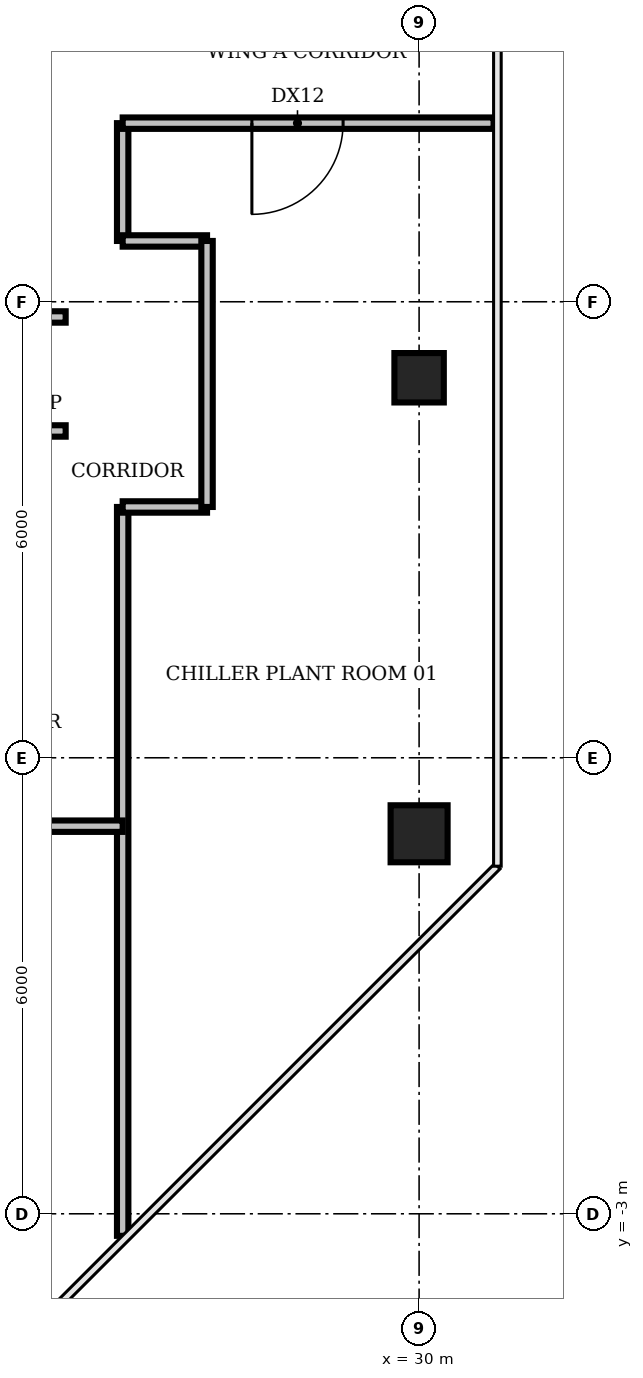
"""IFC4 building model, lengths in metres.
Left out: names, types, materials, properties, quantities, classifications, styles, units other than length and angle.
Written with IfcOpenShell. Run it as: python <this file> out.ifc"""

import sys

from ifc_helpers import new_model, si_unit, direction, frame, frame_2d, origin, origin_2d, place, context, subcontext, project, spatial, rectangle, circle, extrude, element, fill, save


model = new_model("IFC4")
c1 = context("Model", 3, precision=1e-05, world=origin(), true_north=direction((0.0, 1.0)))
c2 = subcontext(c1, "Body", "Model", "MODEL_VIEW")
j1 = project(units=[si_unit("LENGTHUNIT", "METRE"), si_unit("PLANEANGLEUNIT", "RADIAN")], contexts=[c1])
p1 = place(None, origin())
s1 = spatial("IfcSite", under=j1, at=p1, CompositionType="ELEMENT")
p2 = place(p1, origin())
s2 = spatial("IfcBuilding", under=s1, at=p2, CompositionType="ELEMENT")
p3 = place(p2, frame((0.0, 0.0, 339.8)))
s3 = spatial("IfcBuildingStorey", under=s2, at=p3, CompositionType="ELEMENT", Elevation=339.8)
p4 = place(p3, frame((30.0, 2.0, 0.0), z_axis=(0.0, 0.0, 1.0), x_axis=(1.0, 0.0, 0.0)))
e1 = element("IfcColumn", 1, at=p4, inside=s3, PredefinedType="COLUMN", context=c2, shape_type="SweptSolid", body=[
    extrude(circle(Radius=0.375, at=origin_2d()), origin(), (0.0, 0.0, 1.0), 3.9),
])
p5 = place(p3, frame((30.0, 8.0, 0.0), z_axis=(0.0, 0.0, 1.0), x_axis=(1.0, 0.0, 0.0)))
e2 = element("IfcColumn", 2, at=p5, inside=s3, PredefinedType="COLUMN", context=c2, shape_type="SweptSolid", body=[
    extrude(rectangle(XDim=0.65, YDim=0.65, at=origin_2d()), origin(), (0.0, 0.0, 1.0), 3.9),
])
for number, where, z_axis, x_axis in (
    (3, (24.3, 7.3, 0.0), (0.0, 0.0, 1.0), (1.0, 0.0, 0.0)),
    (4, (24.3, 8.8, 0.0), (0.0, 0.0, 1.0), (1.0, 0.0, 0.0)),
):
    element("IfcWall", number, at=place(p3, frame(where, z_axis=z_axis, x_axis=x_axis)), inside=s3, PredefinedType="PARTITIONING", context=c2, shape_type="SweptSolid", body=[
        extrude(rectangle(XDim=1.05, YDim=0.15, at=frame_2d((0.525, 0.0))), origin(), (0.0, 0.0, 1.0), 2.95),
    ])
p6 = place(p3, frame((26.1, -3.29, 0.0), z_axis=(0.0, 0.0, 1.0), x_axis=(0.0, 1.0, 0.0)))
e5 = element("IfcWall", 5, at=p6, inside=s3, PredefinedType="PARTITIONING", context=c2, shape_type="SweptSolid", body=[
    extrude(rectangle(XDim=9.59, YDim=0.15, at=frame_2d((4.795, 0.0))), origin(), (0.0, 0.0, 1.0), 2.95),
])
p7 = place(p3, frame((26.1, 2.1, 0.0), z_axis=(0.0, 0.0, 1.0), x_axis=(-1.0, 0.0, 0.0)))
e6 = element("IfcWall", 6, at=p7, inside=s3, PredefinedType="PARTITIONING", context=c2, shape_type="SweptSolid", body=[
    extrude(rectangle(XDim=22.2, YDim=0.15, at=frame_2d((11.1, 0.0))), origin(), (0.0, 0.0, 1.0), 2.95),
])
p8 = place(p7, frame((10.6, 0.0, 0.0)))
e7 = element("IfcOpeningElement", 7, at=p8, cuts=e6, PredefinedType="OPENING", context=c2, shape_type="SweptSolid", body=[
    extrude(rectangle(XDim=1.2, YDim=2.1, at=frame_2d((0.6, 1.05))), frame((0.0, 0.085, 0.0), z_axis=(0.0, -1.0, 0.0), x_axis=(1.0, 0.0, 0.0)), (0.0, 0.0, 1.0), 0.17),
])
p9 = place(p3, frame((26.1, 6.3, 0.0), z_axis=(0.0, 0.0, 1.0), x_axis=(1.0, 0.0, 0.0)))
e8 = element("IfcWall", 8, at=p9, inside=s3, PredefinedType="PARTITIONING", context=c2, shape_type="SweptSolid", body=[
    extrude(rectangle(XDim=1.11, YDim=0.15, at=frame_2d((0.555, 0.0))), origin(), (0.0, 0.0, 1.0), 2.95),
])
p10 = place(p3, frame((26.1, 9.8, 0.0), z_axis=(0.0, 0.0, 1.0), x_axis=(0.0, 1.0, 0.0)))
e9 = element("IfcWall", 9, at=p10, inside=s3, PredefinedType="PARTITIONING", context=c2, shape_type="SweptSolid", body=[
    extrude(rectangle(XDim=1.55, YDim=0.15, at=frame_2d((0.775, 0.0))), origin(), (0.0, 0.0, 1.0), 2.95),
])
p11 = place(p3, frame((26.1, 9.8, 0.0), z_axis=(0.0, 0.0, 1.0), x_axis=(1.0, 0.0, 0.0)))
e10 = element("IfcWall", 10, at=p11, inside=s3, PredefinedType="PARTITIONING", context=c2, shape_type="SweptSolid", body=[
    extrude(rectangle(XDim=1.11, YDim=0.15, at=frame_2d((0.555, 0.0))), origin(), (0.0, 0.0, 1.0), 2.95),
])
p12 = place(p3, frame((27.21, 6.3, 0.0), z_axis=(0.0, 0.0, 1.0), x_axis=(0.0, 1.0, 0.0)))
e11 = element("IfcWall", 11, at=p12, inside=s3, PredefinedType="PARTITIONING", context=c2, shape_type="SweptSolid", body=[
    extrude(rectangle(XDim=3.5, YDim=0.15, at=frame_2d((1.75, 0.0))), origin(), (0.0, 0.0, 1.0), 2.95),
])
p13 = place(p3, frame((30.98, 11.35, 0.0), z_axis=(0.0, 0.0, 1.0), x_axis=(-1.0, 0.0, 0.0)))
e12 = element("IfcWall", 12, at=p13, inside=s3, PredefinedType="PARTITIONING", context=c2, shape_type="SweptSolid", body=[
    extrude(rectangle(XDim=4.88, YDim=0.15, at=frame_2d((2.44, 0.0))), origin(), (0.0, 0.0, 1.0), 2.95),
])
p14 = place(p13, frame((1.98, 0.0, 0.0)))
e13 = element("IfcOpeningElement", 13, at=p14, cuts=e12, PredefinedType="OPENING", context=c2, shape_type="SweptSolid", body=[
    extrude(rectangle(XDim=1.2, YDim=2.1, at=frame_2d((0.6, 1.05))), frame((0.0, 0.085, 0.0), z_axis=(0.0, -1.0, 0.0), x_axis=(1.0, 0.0, 0.0)), (0.0, 0.0, 1.0), 0.17),
])
p15 = place(p14, origin())
e14 = element("IfcDoor", 14, at=p15, inside=s3, OperationType="SINGLE_SWING_RIGHT", PredefinedType="DOOR", context=c2, shape_type="SweptSolid", body=[
    extrude(rectangle(XDim=1.2, YDim=2.1, at=frame_2d((0.6, 1.05))), frame((0.0, 0.025, 0.0), z_axis=(0.0, -1.0, 0.0), x_axis=(1.0, 0.0, 0.0)), (0.0, 0.0, 1.0), 0.05),
])
fill(e13, e14)
save(model, sys.argv[1])
